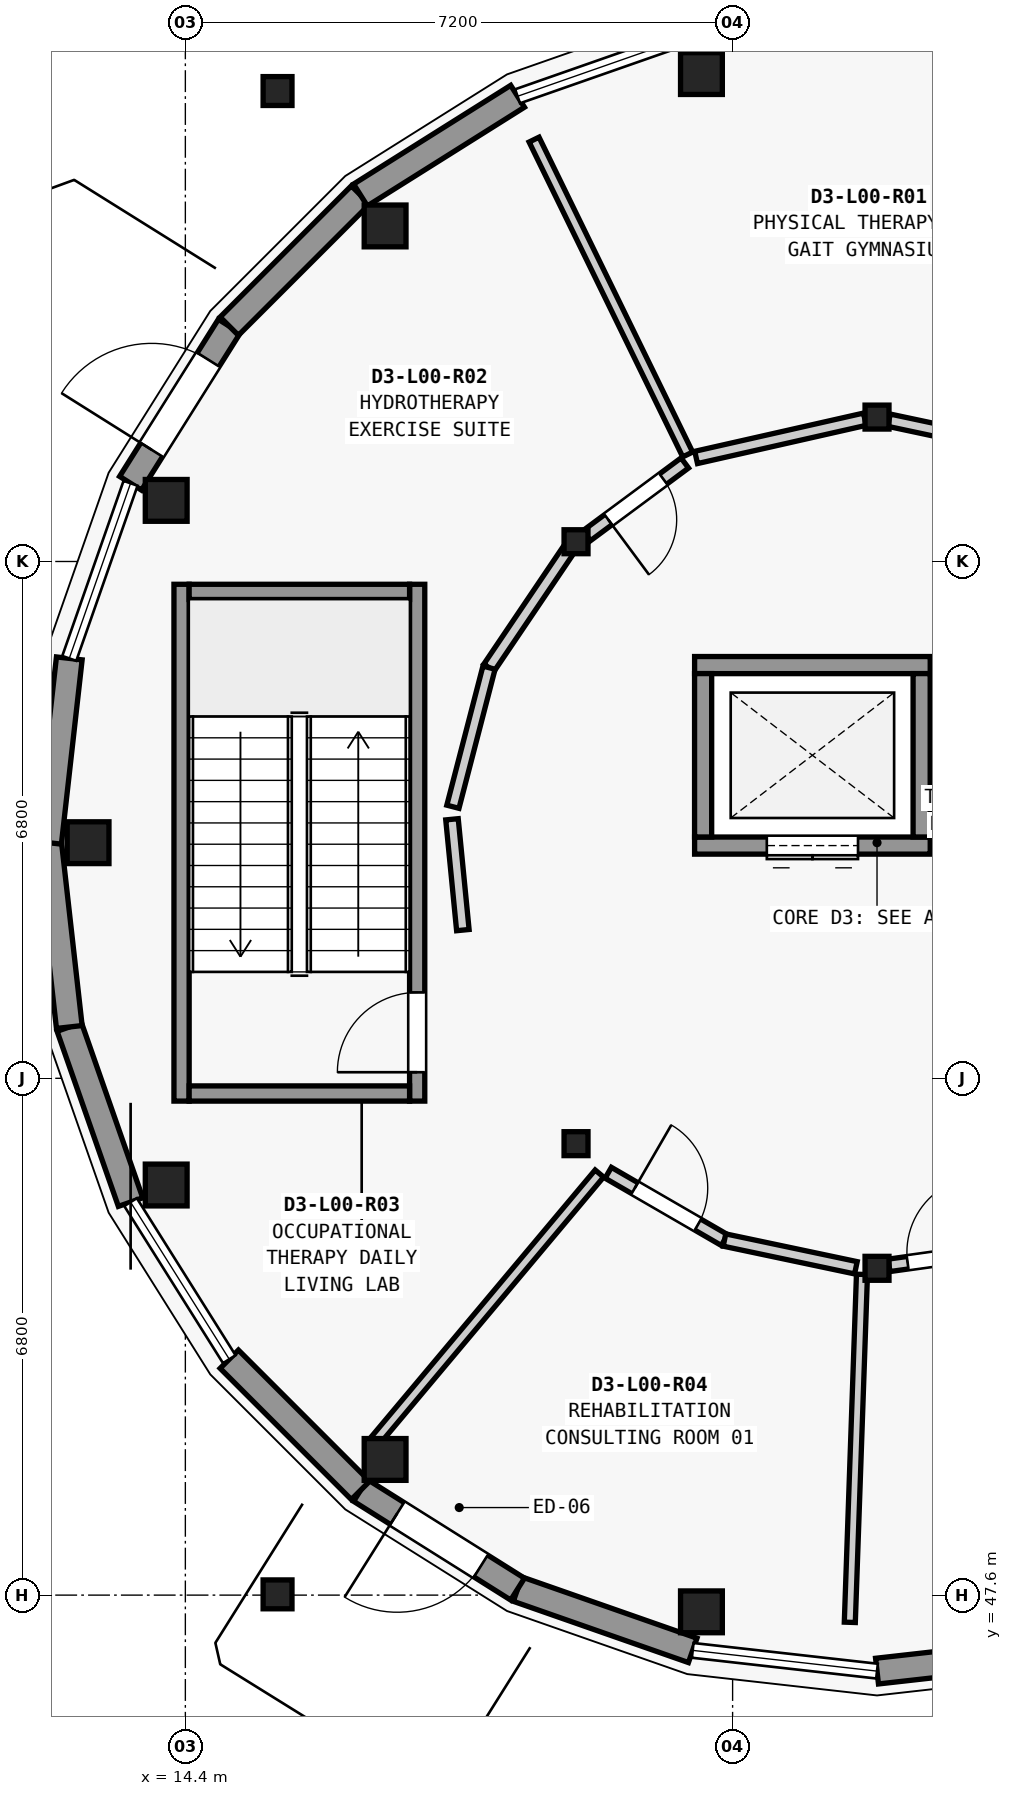
"""IFC4 building model, lengths in metres.
Left out: names, types, materials, properties, quantities, classifications, styles, units other than length and angle.
Written with IfcOpenShell. Run it as: python <this file> out.ifc"""

import sys

from ifc_helpers import new_model, si_unit, direction, frame, frame_2d, origin, origin_2d, place, context, subcontext, project, spatial, rectangle, circle, extrude, element, fill, save


model = new_model("IFC4")
c1 = context("Model", 3, precision=1e-05, world=origin(), true_north=direction((0.0, 1.0)))
c2 = subcontext(c1, "Body", "Model", "MODEL_VIEW")
j1 = project(units=[si_unit("LENGTHUNIT", "METRE"), si_unit("PLANEANGLEUNIT", "RADIAN")], contexts=[c1])
p1 = place(None, origin())
s1 = spatial("IfcSite", under=j1, at=p1, CompositionType="ELEMENT")
p2 = place(p1, origin())
s2 = spatial("IfcBuilding", under=s1, at=p2, CompositionType="ELEMENT")
p3 = place(p2, origin())
s3 = spatial("IfcBuildingStorey", under=s2, at=p3, CompositionType="ELEMENT", Elevation=0.0)
for number, where, z_axis, x_axis in (
    (1, (21.19, 67.62, 0.0), (0.0, 0.0, 1.0), (1.0, 0.0, 0.0)),
    (2, (17.028, 65.615, 0.0), (0.0, 0.0, 1.0), (1.0, 0.0, 0.0)),
    (3, (14.148, 62.004, 0.0), (0.0, 0.0, 1.0), (1.0, 0.0, 0.0)),
    (4, (13.12, 57.5, 0.0), (0.0, 0.0, 1.0), (1.0, 0.0, 0.0)),
    (5, (14.148, 52.996, 0.0), (0.0, 0.0, 1.0), (1.0, 0.0, 0.0)),
    (6, (17.028, 49.385, 0.0), (0.0, 0.0, 1.0), (1.0, 0.0, 0.0)),
    (7, (21.19, 47.38, 0.0), (0.0, 0.0, 1.0), (1.0, 0.0, 0.0)),
):
    element("IfcColumn", number, at=place(p3, frame(where, z_axis=z_axis, x_axis=x_axis)), inside=s3, PredefinedType="PILASTER", context=c2, shape_type="SweptSolid", body=[
        extrude(circle(Radius=0.275, at=origin_2d()), origin(), (0.0, 0.0, 1.0), 4.55),
    ])
for number, where, z_axis, x_axis in (
    (8, (23.5, 63.1, 0.0), (0.0, 0.0, 1.0), (1.0, 0.0, 0.0)),
    (9, (19.54, 61.46, 0.0), (0.0, 0.0, 1.0), (1.0, 0.0, 0.0)),
    (10, (19.54, 53.54, 0.0), (0.0, 0.0, 1.0), (1.0, 0.0, 0.0)),
    (11, (23.5, 51.9, 0.0), (0.0, 0.0, 1.0), (1.0, 0.0, 0.0)),
):
    element("IfcColumn", number, at=place(p3, frame(where, z_axis=z_axis, x_axis=x_axis)), inside=s3, PredefinedType="COLUMN", context=c2, shape_type="SweptSolid", body=[
        extrude(rectangle(XDim=0.315, YDim=0.315, at=origin_2d()), origin(), (0.0, 0.0, 1.0), 4.55),
    ])
for number, where, z_axis, x_axis in (
    (12, (15.613, 67.39, 1.15), (0.0, 0.0, 1.0), (1.0, 0.0, 0.0)),
    (13, (15.613, 47.61, 1.15), (0.0, 0.0, 1.0), (1.0, 0.0, 0.0)),
):
    element("IfcColumn", number, at=place(p3, frame(where, z_axis=z_axis, x_axis=x_axis)), inside=s3, PredefinedType="PILASTER", context=c2, shape_type="SweptSolid", body=[
        extrude(circle(Radius=0.19, at=origin_2d()), origin(), (0.0, 0.0, 1.0), 3.4),
    ])
p4 = place(p3, frame((25.925, 46.873, 0.0), z_axis=(0.0, 0.0, 1.0), x_axis=(-0.993725340882, -0.111847873866, 0.0)))
e14 = element("IfcWall", 14, at=p4, inside=s3, PredefinedType="SOLIDWALL", context=c2, shape_type="SweptSolid", body=[
    extrude(rectangle(XDim=2.44, YDim=0.34, at=frame_2d((1.22, 0.0))), origin(), (0.0, 0.0, 1.0), 3.659),
])
p5 = place(p3, frame((21.075, 46.873, 0.0), z_axis=(0.0, 0.0, 1.0), x_axis=(-0.943919156274, 0.330176659411, 0.0)))
e15 = element("IfcWall", 15, at=p5, inside=s3, PredefinedType="SOLIDWALL", context=c2, shape_type="SweptSolid", body=[
    extrude(rectangle(XDim=2.441, YDim=0.34, at=frame_2d((1.22, 0.0))), origin(), (0.0, 0.0, 1.0), 3.659),
])
p6 = place(p3, frame((18.771, 47.679, 0.0), z_axis=(0.0, 0.0, 1.0), x_axis=(-0.846658434148, 0.532136726684, 0.0)))
e16 = element("IfcWall", 16, at=p6, inside=s3, PredefinedType="SOLIDWALL", context=c2, shape_type="SweptSolid", body=[
    extrude(rectangle(XDim=2.441, YDim=0.34, at=frame_2d((1.221, 0.0))), origin(), (0.0, 0.0, 1.0), 3.659),
])
p7 = place(p6, frame((0.571, 0.0, 0.0)))
e17 = element("IfcOpeningElement", 17, at=p7, cuts=e16, PredefinedType="OPENING", context=c2, shape_type="SweptSolid", body=[
    extrude(rectangle(XDim=1.3, YDim=2.25, at=frame_2d((0.65, 1.125))), frame((0.0, 0.18, 0.0), z_axis=(0.0, -1.0, 0.0), x_axis=(1.0, 0.0, 0.0)), (0.0, 0.0, 1.0), 0.36),
])
for number, where, z_axis, x_axis in (
    (18, (16.704, 48.978, 0.0), (0.0, 0.0, 1.0), (-0.707, 0.707, 0.0)),
    (19, (13.679, 52.771, 0.0), (0.0, 0.0, 1.0), (-0.33, 0.944, 0.0)),
):
    element("IfcWall", number, at=place(p3, frame(where, z_axis=z_axis, x_axis=x_axis)), inside=s3, PredefinedType="SOLIDWALL", context=c2, shape_type="SweptSolid", body=[
        extrude(rectangle(XDim=2.441, YDim=0.34, at=frame_2d((1.22, 0.0))), origin(), (0.0, 0.0, 1.0), 3.659),
    ])
for number, where, z_axis, x_axis in (
    (20, (12.873, 55.075, 0.0), (0.0, 0.0, 1.0), (-0.112, 0.994, 0.0)),
    (21, (12.6, 57.5, 0.0), (0.0, 0.0, 1.0), (0.112, 0.994, 0.0)),
):
    element("IfcWall", number, at=place(p3, frame(where, z_axis=z_axis, x_axis=x_axis)), inside=s3, PredefinedType="SOLIDWALL", context=c2, shape_type="SweptSolid", body=[
        extrude(rectangle(XDim=2.44, YDim=0.34, at=frame_2d((1.22, 0.0))), origin(), (0.0, 0.0, 1.0), 3.659),
    ])
p8 = place(p3, frame((13.679, 62.229, 0.0), z_axis=(0.0, 0.0, 1.0), x_axis=(0.532136726684, 0.846658434148, 0.0)))
e22 = element("IfcWall", 22, at=p8, inside=s3, PredefinedType="SOLIDWALL", context=c2, shape_type="SweptSolid", body=[
    extrude(rectangle(XDim=2.441, YDim=0.34, at=frame_2d((1.221, 0.0))), origin(), (0.0, 0.0, 1.0), 3.659),
])
p9 = place(p8, frame((0.521, 0.0, 0.0)))
e23 = element("IfcOpeningElement", 23, at=p9, cuts=e22, PredefinedType="OPENING", context=c2, shape_type="SweptSolid", body=[
    extrude(rectangle(XDim=1.4, YDim=2.3, at=frame_2d((0.7, 1.15))), frame((0.0, 0.18, 0.0), z_axis=(0.0, -1.0, 0.0), x_axis=(1.0, 0.0, 0.0)), (0.0, 0.0, 1.0), 0.36),
])
p10 = place(p3, frame((14.978, 64.296, 0.0), z_axis=(0.0, 0.0, 1.0), x_axis=(0.707106781187, 0.707106781187, 0.0)))
e24 = element("IfcWall", 24, at=p10, inside=s3, PredefinedType="SOLIDWALL", context=c2, shape_type="SweptSolid", body=[
    extrude(rectangle(XDim=2.441, YDim=0.34, at=frame_2d((1.22, 0.0))), origin(), (0.0, 0.0, 1.0), 3.659),
])
p11 = place(p3, frame((16.704, 66.022, 0.0), z_axis=(0.0, 0.0, 1.0), x_axis=(0.846658434148, 0.532136726684, 0.0)))
e25 = element("IfcWall", 25, at=p11, inside=s3, PredefinedType="SOLIDWALL", context=c2, shape_type="SweptSolid", body=[
    extrude(rectangle(XDim=2.441, YDim=0.34, at=frame_2d((1.221, 0.0))), origin(), (0.0, 0.0, 1.0), 3.659),
])
p12 = place(p3, frame((17.45, 54.1, 0.0), z_axis=(0.0, 0.0, 1.0), x_axis=(0.0, 1.0, 0.0)))
e26 = element("IfcWall", 26, at=p12, inside=s3, PredefinedType="SHEAR", context=c2, shape_type="SweptSolid", body=[
    extrude(rectangle(XDim=6.8, YDim=0.2, at=frame_2d((3.4, 0.0))), origin(), (0.0, 0.0, 1.0), 4.305),
])
p13 = place(p12, frame((0.38, 0.0, 0.0)))
e27 = element("IfcOpeningElement", 27, at=p13, cuts=e26, PredefinedType="OPENING", context=c2, shape_type="SweptSolid", body=[
    extrude(rectangle(XDim=1.05, YDim=2.15, at=frame_2d((0.525, 1.075))), frame((0.0, 0.11, 0.0), z_axis=(0.0, -1.0, 0.0), x_axis=(1.0, 0.0, 0.0)), (0.0, 0.0, 1.0), 0.22),
])
p14 = place(p3, frame((14.35, 54.1, 0.0), z_axis=(0.0, 0.0, 1.0), x_axis=(0.0, 1.0, 0.0)))
e28 = element("IfcWall", 28, at=p14, inside=s3, PredefinedType="SHEAR", context=c2, shape_type="SweptSolid", body=[
    extrude(rectangle(XDim=6.8, YDim=0.2, at=frame_2d((3.4, 0.0))), origin(), (0.0, 0.0, 1.0), 4.305),
])
for number, where, z_axis, x_axis in (
    (29, (17.35, 54.2, 0.0), (0.0, 0.0, 1.0), (-1.0, 0.0, 0.0)),
    (30, (17.35, 60.8, 0.0), (0.0, 0.0, 1.0), (-1.0, 0.0, 0.0)),
):
    element("IfcWall", number, at=place(p3, frame(where, z_axis=z_axis, x_axis=x_axis)), inside=s3, PredefinedType="SHEAR", context=c2, shape_type="SweptSolid", body=[
        extrude(rectangle(XDim=2.9, YDim=0.2, at=frame_2d((1.45, 0.0))), origin(), (0.0, 0.0, 1.0), 4.305),
    ])
p15 = place(p3, frame((21.1, 57.462, 0.0), z_axis=(0.0, 0.0, 1.0), x_axis=(1.0, 0.0, 0.0)))
e31 = element("IfcWall", 31, at=p15, inside=s3, PredefinedType="SHEAR", context=c2, shape_type="SweptSolid", body=[
    extrude(rectangle(XDim=3.1, YDim=0.225, at=frame_2d((1.55, 0.0))), origin(), (0.0, 0.0, 1.0), 4.305),
])
p16 = place(p15, frame((0.95, 0.0, 0.0)))
e32 = element("IfcOpeningElement", 32, at=p16, cuts=e31, PredefinedType="OPENING", context=c2, shape_type="SweptSolid", body=[
    extrude(rectangle(XDim=1.2, YDim=2.2, at=frame_2d((0.6, 1.1))), frame((0.0, 0.123, 0.0), z_axis=(0.0, -1.0, 0.0), x_axis=(1.0, 0.0, 0.0)), (0.0, 0.0, 1.0), 0.245),
])
p17 = place(p3, frame((21.1, 59.837, 0.0), z_axis=(0.0, 0.0, 1.0), x_axis=(1.0, 0.0, 0.0)))
e33 = element("IfcWall", 33, at=p17, inside=s3, PredefinedType="SHEAR", context=c2, shape_type="SweptSolid", body=[
    extrude(rectangle(XDim=3.1, YDim=0.225, at=frame_2d((1.55, 0.0))), origin(), (0.0, 0.0, 1.0), 4.305),
])
for number, where, z_axis, x_axis in (
    (34, (21.212, 57.575, 0.0), (0.0, 0.0, 1.0), (0.0, 1.0, 0.0)),
    (35, (24.087, 57.575, 0.0), (0.0, 0.0, 1.0), (0.0, 1.0, 0.0)),
):
    element("IfcWall", number, at=place(p3, frame(where, z_axis=z_axis, x_axis=x_axis)), inside=s3, PredefinedType="SHEAR", context=c2, shape_type="SweptSolid", body=[
        extrude(rectangle(XDim=2.15, YDim=0.225, at=frame_2d((1.075, 0.0))), origin(), (0.0, 0.0, 1.0), 4.305),
    ])
p18 = place(p3, frame((21.009, 62.608, 0.0), z_axis=(0.0, 0.0, 1.0), x_axis=(-0.438421545089, 0.898769463657, 0.0)))
e36 = element("IfcWall", 36, at=p18, inside=s3, PredefinedType="PARTITIONING", context=c2, shape_type="SweptSolid", body=[
    extrude(rectangle(XDim=4.61, YDim=0.145, at=frame_2d((2.305, 0.0))), origin(), (0.0, 0.0, 1.0), 3.634),
])
p19 = place(p3, frame((19.847, 53.147, 0.0), z_axis=(0.0, 0.0, 1.0), x_axis=(-0.64262938355, -0.766177182771, 0.0)))
e37 = element("IfcWall", 37, at=p19, inside=s3, PredefinedType="PARTITIONING", context=c2, shape_type="SweptSolid", body=[
    extrude(rectangle(XDim=4.59, YDim=0.145, at=frame_2d((2.295, 0.0))), origin(), (0.0, 0.0, 1.0), 3.634),
])
p20 = place(p3, frame((23.302, 51.82, 0.0), z_axis=(0.0, 0.0, 1.0), x_axis=(-0.034908318573, -0.999390518914, 0.0)))
e38 = element("IfcWall", 38, at=p20, inside=s3, PredefinedType="PARTITIONING", context=c2, shape_type="SweptSolid", body=[
    extrude(rectangle(XDim=4.581, YDim=0.145, at=frame_2d((2.291, 0.0))), origin(), (0.0, 0.0, 1.0), 3.634),
])
p21 = place(p3, frame((25.812, 62.601, 0.0), z_axis=(0.0, 0.0, 1.0), x_axis=(-0.978152936259, 0.207886587563, 0.0)))
e39 = element("IfcWall", 39, at=p21, inside=s3, PredefinedType="PARTITIONING", context=c2, shape_type="SweptSolid", body=[
    extrude(rectangle(XDim=2.203, YDim=0.165, at=frame_2d((1.102, 0.0))), origin(), (0.0, 0.0, 1.0), 3.634),
])
p22 = place(p3, frame((23.34, 63.072, 0.0), z_axis=(0.0, 0.0, 1.0), x_axis=(-0.975285396453, -0.2209488526, 0.0)))
e40 = element("IfcWall", 40, at=p22, inside=s3, PredefinedType="PARTITIONING", context=c2, shape_type="SweptSolid", body=[
    extrude(rectangle(XDim=2.276, YDim=0.165, at=frame_2d((1.138, 0.0))), origin(), (0.0, 0.0, 1.0), 3.634),
])
p23 = place(p3, frame((20.971, 62.496, 0.0), z_axis=(0.0, 0.0, 1.0), x_axis=(-0.803417109956, -0.59541661669, 0.0)))
e41 = element("IfcWall", 41, at=p23, inside=s3, PredefinedType="PARTITIONING", context=c2, shape_type="SweptSolid", body=[
    extrude(rectangle(XDim=1.606, YDim=0.165, at=frame_2d((0.803, 0.0))), origin(), (0.0, 0.0, 1.0), 3.634),
])
p24 = place(p23, frame((0.353, 0.0, 0.0)))
e42 = element("IfcOpeningElement", 42, at=p24, cuts=e41, PredefinedType="OPENING", context=c2, shape_type="SweptSolid", body=[
    extrude(rectangle(XDim=0.9, YDim=2.1, at=frame_2d((0.45, 1.05))), frame((0.0, 0.093, 0.0), z_axis=(0.0, -1.0, 0.0), x_axis=(1.0, 0.0, 0.0)), (0.0, 0.0, 1.0), 0.185),
])
p25 = place(p3, frame((19.432, 61.339, 0.0), z_axis=(0.0, 0.0, 1.0), x_axis=(-0.559463805142, -0.828854782659, 0.0)))
e43 = element("IfcWall", 43, at=p25, inside=s3, PredefinedType="PARTITIONING", context=c2, shape_type="SweptSolid", body=[
    extrude(rectangle(XDim=1.853, YDim=0.165, at=frame_2d((0.927, 0.0))), origin(), (0.0, 0.0, 1.0), 3.634),
])
p26 = place(p3, frame((18.395, 59.803, 0.0), z_axis=(0.0, 0.0, 1.0), x_axis=(-0.251275827958, -0.967915522287, 0.0)))
e44 = element("IfcWall", 44, at=p26, inside=s3, PredefinedType="PARTITIONING", context=c2, shape_type="SweptSolid", body=[
    extrude(rectangle(XDim=1.891, YDim=0.165, at=frame_2d((0.945, 0.0))), origin(), (0.0, 0.0, 1.0), 3.634),
])
p27 = place(p3, frame((17.908, 57.808, 0.0), z_axis=(0.0, 0.0, 1.0), x_axis=(0.097655572539, -0.995220271675, 0.0)))
e45 = element("IfcWall", 45, at=p27, inside=s3, PredefinedType="PARTITIONING", context=c2, shape_type="SweptSolid", body=[
    extrude(rectangle(XDim=1.465, YDim=0.165, at=frame_2d((0.732, 0.0))), origin(), (0.0, 0.0, 1.0), 3.634),
])
p28 = place(p3, frame((19.964, 53.157, 0.0), z_axis=(0.0, 0.0, 1.0), x_axis=(0.865448363254, -0.500998134269, 0.0)))
e46 = element("IfcWall", 46, at=p28, inside=s3, PredefinedType="PARTITIONING", context=c2, shape_type="SweptSolid", body=[
    extrude(rectangle(XDim=1.767, YDim=0.165, at=frame_2d((0.883, 0.0))), origin(), (0.0, 0.0, 1.0), 3.634),
])
p29 = place(p28, frame((0.403, 0.0, 0.0)))
e47 = element("IfcOpeningElement", 47, at=p29, cuts=e46, PredefinedType="OPENING", context=c2, shape_type="SweptSolid", body=[
    extrude(rectangle(XDim=0.96, YDim=2.12, at=frame_2d((0.48, 1.06))), frame((0.0, 0.093, 0.0), z_axis=(0.0, -1.0, 0.0), x_axis=(1.0, 0.0, 0.0)), (0.0, 0.0, 1.0), 0.185),
])
p30 = place(p3, frame((21.493, 52.272, 0.0), z_axis=(0.0, 0.0, 1.0), x_axis=(0.978436766116, -0.206546592113, 0.0)))
e48 = element("IfcWall", 48, at=p30, inside=s3, PredefinedType="PARTITIONING", context=c2, shape_type="SweptSolid", body=[
    extrude(rectangle(XDim=1.767, YDim=0.165, at=frame_2d((0.884, 0.0))), origin(), (0.0, 0.0, 1.0), 3.634),
])
p31 = place(p3, frame((23.658, 51.939, 0.0), z_axis=(0.0, 0.0, 1.0), x_axis=(0.99043401567, 0.137987175508, 0.0)))
e49 = element("IfcWall", 49, at=p31, inside=s3, PredefinedType="PARTITIONING", context=c2, shape_type="SweptSolid", body=[
    extrude(rectangle(XDim=1.493, YDim=0.165, at=frame_2d((0.747, 0.0))), origin(), (0.0, 0.0, 1.0), 3.634),
])
p32 = place(p31, frame((0.247, 0.0, 0.0)))
e50 = element("IfcOpeningElement", 50, at=p32, cuts=e49, PredefinedType="OPENING", context=c2, shape_type="SweptSolid", body=[
    extrude(rectangle(XDim=1.0, YDim=2.14, at=frame_2d((0.5, 1.07))), frame((0.0, 0.093, 0.0), z_axis=(0.0, -1.0, 0.0), x_axis=(1.0, 0.0, 0.0)), (0.0, 0.0, 1.0), 0.185),
])
p33 = place(p7, origin())
e51 = element("IfcDoor", 51, at=p33, inside=s3, OperationType="SINGLE_SWING_RIGHT", PredefinedType="DOOR", context=c2, shape_type="SweptSolid", body=[
    extrude(rectangle(XDim=1.3, YDim=2.25, at=frame_2d((0.65, 1.125))), frame((0.0, 0.025, 0.0), z_axis=(0.0, -1.0, 0.0), x_axis=(1.0, 0.0, 0.0)), (0.0, 0.0, 1.0), 0.05),
])
fill(e17, e51)
p34 = place(p9, origin())
e52 = element("IfcDoor", 52, at=p34, inside=s3, OperationType="SINGLE_SWING_LEFT", PredefinedType="DOOR", context=c2, shape_type="SweptSolid", body=[
    extrude(rectangle(XDim=1.4, YDim=2.3, at=frame_2d((0.7, 1.15))), frame((0.0, 0.025, 0.0), z_axis=(0.0, -1.0, 0.0), x_axis=(1.0, 0.0, 0.0)), (0.0, 0.0, 1.0), 0.05),
])
fill(e23, e52)
p35 = place(p13, origin())
e53 = element("IfcDoor", 53, at=p35, inside=s3, OperationType="SINGLE_SWING_LEFT", PredefinedType="DOOR", context=c2, shape_type="SweptSolid", body=[
    extrude(rectangle(XDim=1.05, YDim=2.15, at=frame_2d((0.525, 1.075))), frame((0.0, 0.025, 0.0), z_axis=(0.0, -1.0, 0.0), x_axis=(1.0, 0.0, 0.0)), (0.0, 0.0, 1.0), 0.05),
])
fill(e27, e53)
p36 = place(p16, origin())
e54 = element("IfcDoor", 54, at=p36, inside=s3, OperationType="DOUBLE_DOOR_SLIDING", PredefinedType="DOOR", context=c2, shape_type="SweptSolid", body=[
    extrude(rectangle(XDim=1.2, YDim=2.2, at=frame_2d((0.6, 1.1))), frame((0.0, 0.025, 0.0), z_axis=(0.0, -1.0, 0.0), x_axis=(1.0, 0.0, 0.0)), (0.0, 0.0, 1.0), 0.05),
])
fill(e32, e54)
p37 = place(p24, origin())
e55 = element("IfcDoor", 55, at=p37, inside=s3, OperationType="SINGLE_SWING_RIGHT", PredefinedType="DOOR", context=c2, shape_type="SweptSolid", body=[
    extrude(rectangle(XDim=0.9, YDim=2.1, at=frame_2d((0.45, 1.05))), frame((0.0, 0.025, 0.0), z_axis=(0.0, -1.0, 0.0), x_axis=(1.0, 0.0, 0.0)), (0.0, 0.0, 1.0), 0.05),
])
fill(e42, e55)
p38 = place(p29, origin())
e56 = element("IfcDoor", 56, at=p38, inside=s3, OperationType="SINGLE_SWING_LEFT", PredefinedType="DOOR", context=c2, shape_type="SweptSolid", body=[
    extrude(rectangle(XDim=0.96, YDim=2.12, at=frame_2d((0.48, 1.06))), frame((0.0, 0.025, 0.0), z_axis=(0.0, -1.0, 0.0), x_axis=(1.0, 0.0, 0.0)), (0.0, 0.0, 1.0), 0.05),
])
fill(e47, e56)
p39 = place(p32, origin())
e57 = element("IfcDoor", 57, at=p39, inside=s3, OperationType="SINGLE_SWING_RIGHT", PredefinedType="DOOR", context=c2, shape_type="SweptSolid", body=[
    extrude(rectangle(XDim=1.0, YDim=2.14, at=frame_2d((0.5, 1.07))), frame((0.0, 0.025, 0.0), z_axis=(0.0, -1.0, 0.0), x_axis=(1.0, 0.0, 0.0)), (0.0, 0.0, 1.0), 0.05),
])
fill(e50, e57)
save(model, sys.argv[1])
